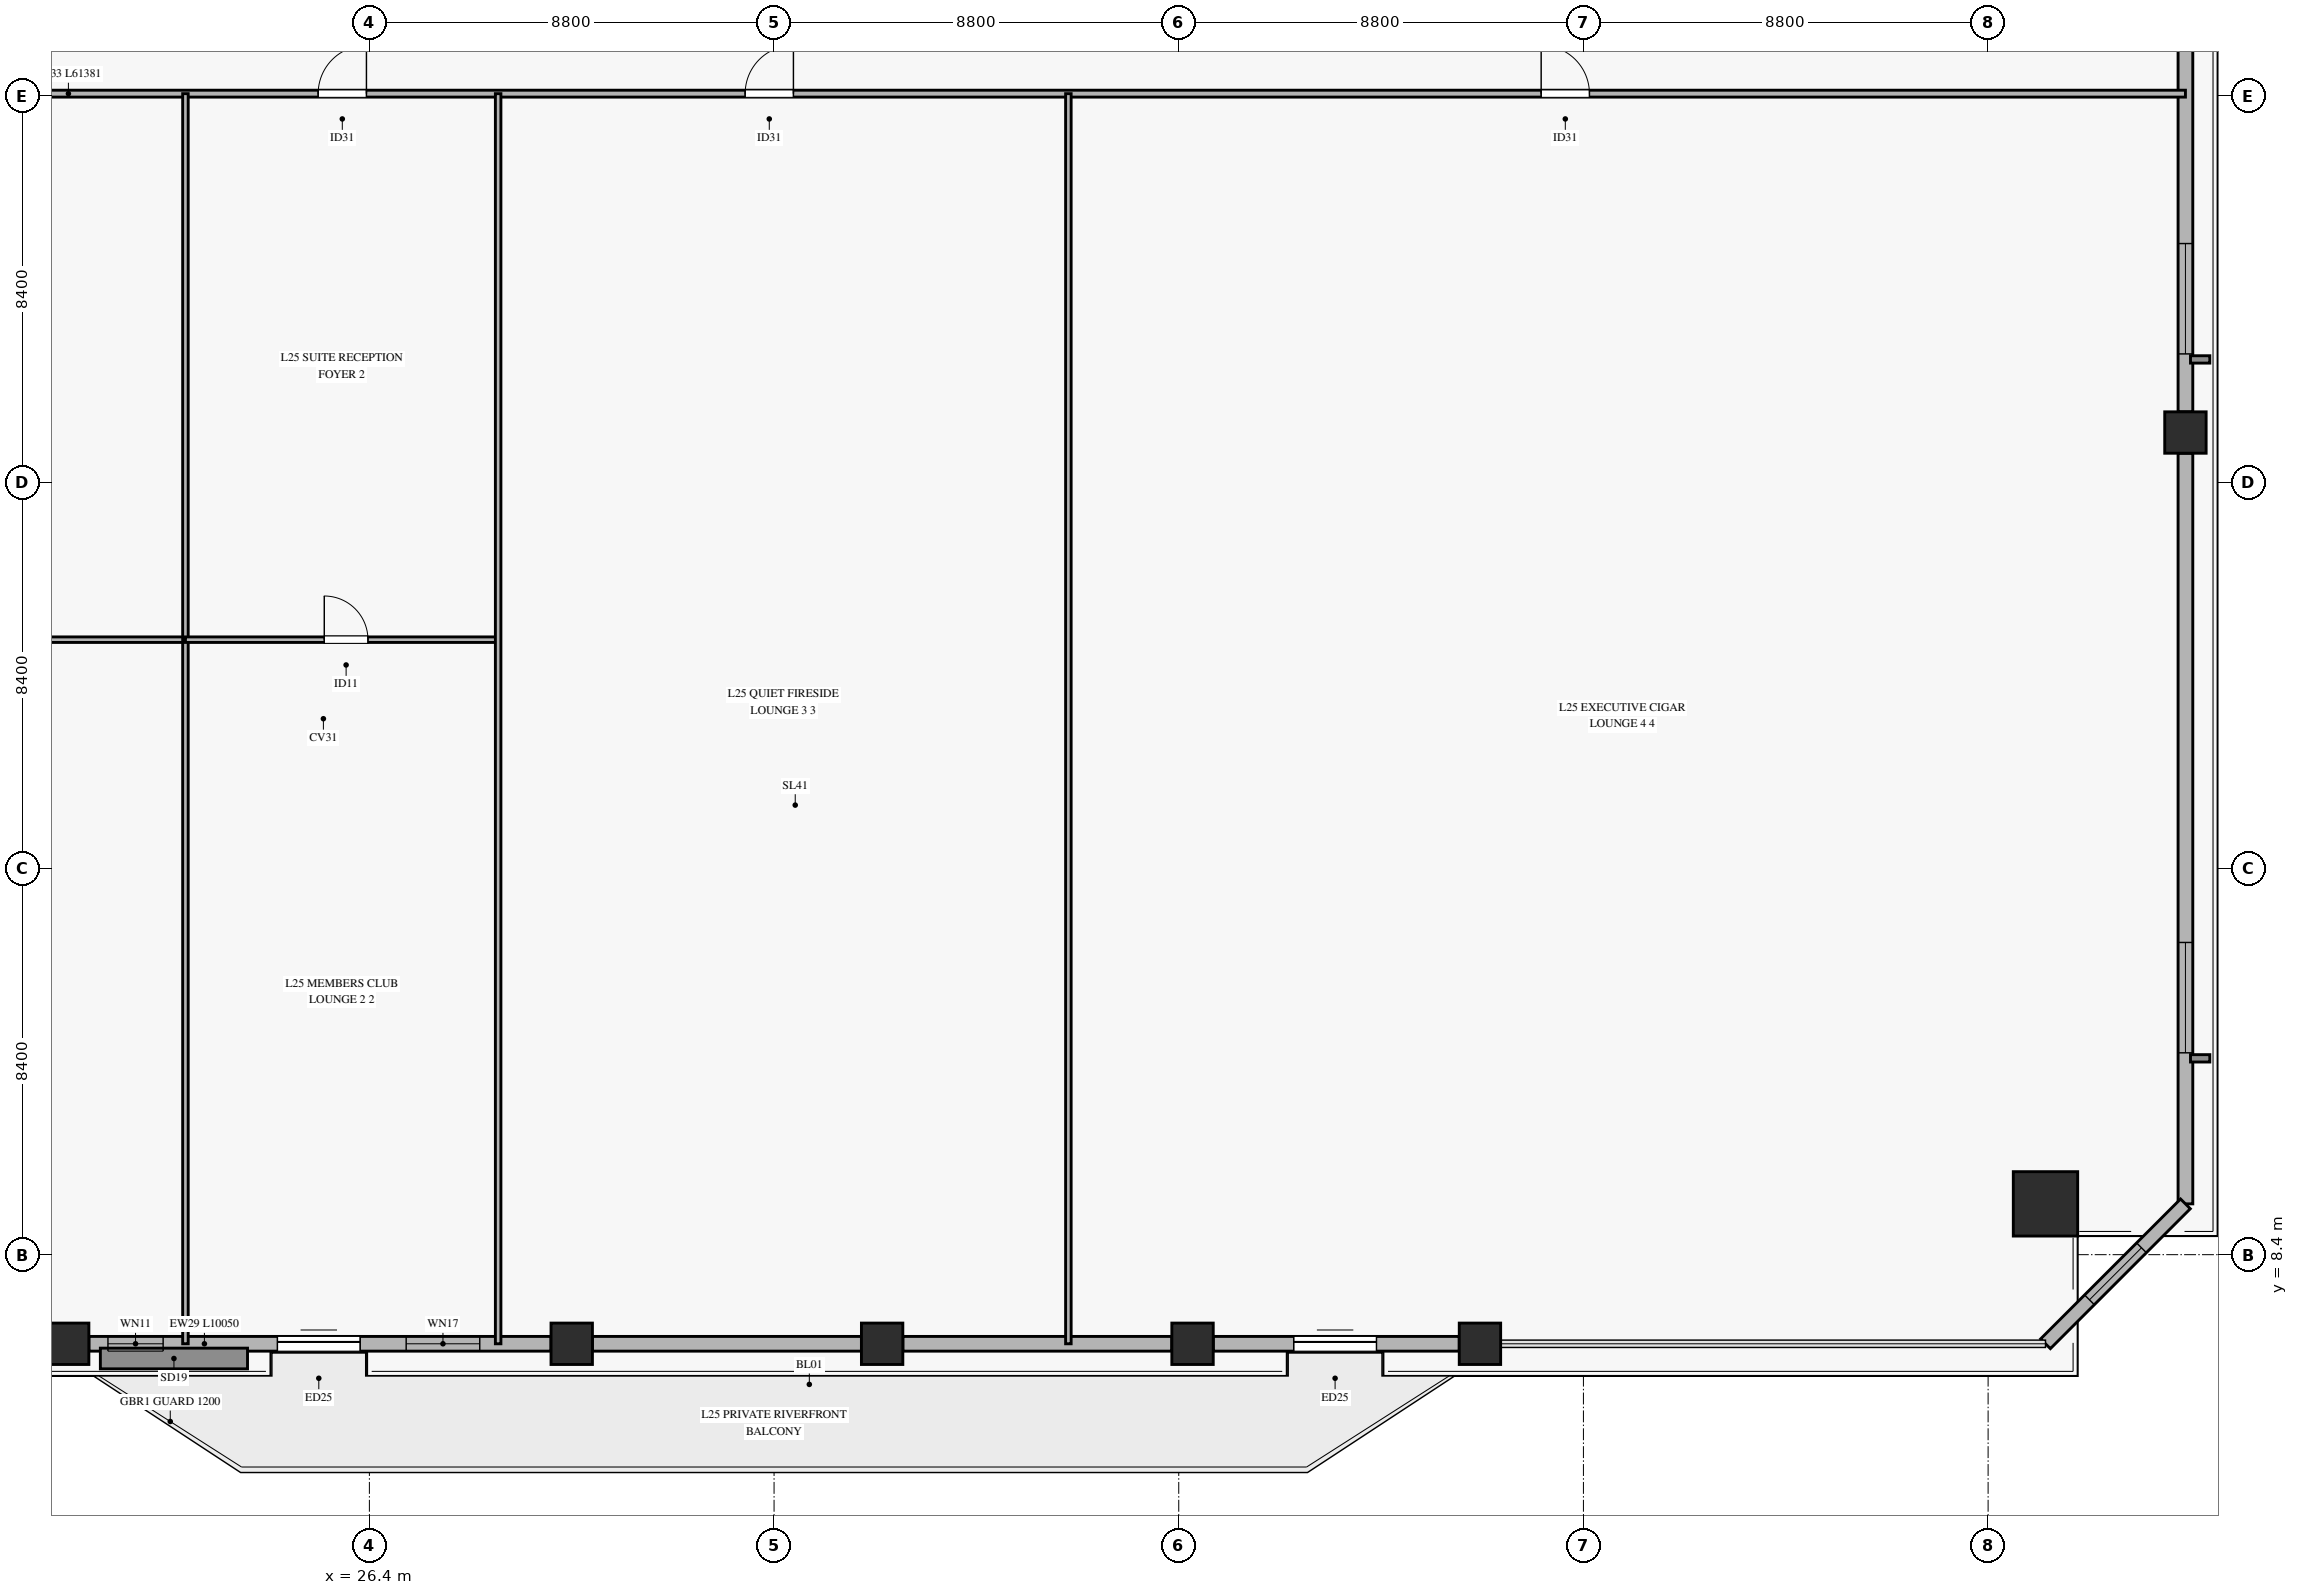
"""IFC4 building model, lengths in metres.
Left out: names, types, materials, properties, quantities, classifications, styles, units other than length and angle.
Written with IfcOpenShell. Run it as: python <this file> out.ifc"""

import sys

from ifc_helpers import new_model, si_unit, direction, frame, frame_2d, origin, origin_2d, place, context, subcontext, project, spatial, rectangle, hollow_rectangle, extrude, source, transform, mapped, element, fill, save


model = new_model("IFC4")
c1 = context("Model", 3, precision=1e-05, world=origin(), true_north=direction((0.0, 1.0)))
c2 = subcontext(c1, "Body", "Model", "MODEL_VIEW")
j1 = project(units=[si_unit("LENGTHUNIT", "METRE"), si_unit("PLANEANGLEUNIT", "RADIAN")], contexts=[c1])
p1 = place(None, origin())
s1 = spatial("IfcSite", under=j1, at=p1, CompositionType="ELEMENT")
p2 = place(p1, origin())
s2 = spatial("IfcBuilding", under=s1, at=p2, CompositionType="ELEMENT")
p3 = place(p2, frame((0.0, 0.0, 103.6)))
s3 = spatial("IfcBuildingStorey", under=s2, at=p3, CompositionType="ELEMENT", Elevation=103.6)
m1 = source(origin(), c2, "Body", "SweptSolid", [
    extrude(hollow_rectangle(XDim=1.4, YDim=1.4, WallThickness=0.065, at=origin_2d()), origin(), (0.0, 0.0, 1.0), 3.68),
])
p4 = place(p3, frame((62.848, 9.505, 0.0), z_axis=(0.0, 0.0, 1.0), x_axis=(1.0, 0.0, 0.0)))
e1 = element("IfcColumn", 1, at=p4, inside=s3, PredefinedType="COLUMN", context=c2, shape_type="MappedRepresentation", body=[
    mapped(m1, transform((0.0, 0.0, 0.0), x_axis=(1.0, 0.0, 0.0), y_axis=(0.0, 1.0, 0.0), z_axis=(0.0, 0.0, 1.0), scale=1.0)),
])
m2 = source(origin(), c2, "Body", "SweptSolid", [
    extrude(hollow_rectangle(XDim=0.9, YDim=0.9, WallThickness=0.04, at=origin_2d()), origin(), (0.0, 0.0, 1.0), 3.68),
])
for number, where, z_axis, x_axis in (
    (2, (19.85, 6.462, 0.0), (0.0, 0.0, 1.0), (1.0, 0.0, 0.0)),
    (3, (30.8, 6.462, 0.0), (0.0, 0.0, 1.0), (1.0, 0.0, 0.0)),
    (4, (37.55, 6.462, 0.0), (0.0, 0.0, 1.0), (1.0, 0.0, 0.0)),
    (5, (44.3, 6.462, 0.0), (0.0, 0.0, 1.0), (1.0, 0.0, 0.0)),
    (6, (50.55, 6.462, 0.0), (0.0, 0.0, 1.0), (1.0, 0.0, 0.0)),
    (7, (65.891, 26.28, 0.0), (0.0, 0.0, 1.0), (1.0, 0.0, 0.0)),
):
    element("IfcColumn", number, at=place(p3, frame(where, z_axis=z_axis, x_axis=x_axis)), inside=s3, PredefinedType="COLUMN", context=c2, shape_type="MappedRepresentation", body=[
        mapped(m2, transform((0.0, 0.0, 0.0), x_axis=(1.0, 0.0, 0.0), y_axis=(0.0, 1.0, 0.0), z_axis=(0.0, 0.0, 1.0), scale=1.0)),
    ])
p5 = place(p3, frame((20.3, 6.462, 0.0), z_axis=(0.0, 0.0, 1.0), x_axis=(1.0, 0.0, 0.0)))
e8 = element("IfcWall", 8, at=p5, inside=s3, PredefinedType="SOLIDWALL", context=c2, shape_type="SweptSolid", body=[
    extrude(rectangle(XDim=10.05, YDim=0.32, at=frame_2d((5.025, 0.0))), origin(), (0.0, 0.0, 1.0), 3.16),
])
p6 = place(p5, frame((4.1, 0.0, 0.0)))
e9 = element("IfcOpeningElement", 9, at=p6, cuts=e8, PredefinedType="OPENING", context=c2, shape_type="SweptSolid", body=[
    extrude(rectangle(XDim=1.8, YDim=2.25, at=frame_2d((0.9, 1.125))), frame((0.0, 0.17, 0.0), z_axis=(0.0, -1.0, 0.0), x_axis=(1.0, 0.0, 0.0)), (0.0, 0.0, 1.0), 0.34),
])
p7 = place(p5, frame((0.415, 0.0, 0.45)))
e10 = element("IfcOpeningElement", 10, at=p7, cuts=e8, PredefinedType="OPENING", context=c2, shape_type="SweptSolid", body=[
    extrude(rectangle(XDim=1.2, YDim=2.0, at=frame_2d((0.6, 1.0))), frame((0.0, 0.17, 0.0), z_axis=(0.0, -1.0, 0.0), x_axis=(1.0, 0.0, 0.0)), (0.0, 0.0, 1.0), 0.34),
])
p8 = place(p5, frame((6.9, 0.0, 0.45)))
e11 = element("IfcOpeningElement", 11, at=p8, cuts=e8, PredefinedType="OPENING", context=c2, shape_type="SweptSolid", body=[
    extrude(rectangle(XDim=1.6, YDim=2.0, at=frame_2d((0.8, 1.0))), frame((0.0, 0.17, 0.0), z_axis=(0.0, -1.0, 0.0), x_axis=(1.0, 0.0, 0.0)), (0.0, 0.0, 1.0), 0.34),
])
for number, where, z_axis, x_axis in (
    (12, (31.25, 6.462, 0.0), (0.0, 0.0, 1.0), (1.0, 0.0, 0.0)),
    (13, (38.0, 6.462, 0.0), (0.0, 0.0, 1.0), (1.0, 0.0, 0.0)),
):
    element("IfcWall", number, at=place(p3, frame(where, z_axis=z_axis, x_axis=x_axis)), inside=s3, PredefinedType="SOLIDWALL", context=c2, shape_type="SweptSolid", body=[
        extrude(rectangle(XDim=5.85, YDim=0.32, at=frame_2d((2.925, 0.0))), origin(), (0.0, 0.0, 1.0), 3.16),
    ])
p9 = place(p3, frame((44.75, 6.462, 0.0), z_axis=(0.0, 0.0, 1.0), x_axis=(1.0, 0.0, 0.0)))
e14 = element("IfcWall", 14, at=p9, inside=s3, PredefinedType="SOLIDWALL", context=c2, shape_type="SweptSolid", body=[
    extrude(rectangle(XDim=5.35, YDim=0.32, at=frame_2d((2.675, 0.0))), origin(), (0.0, 0.0, 1.0), 3.16),
])
p10 = place(p9, frame((1.75, 0.0, 0.0)))
e15 = element("IfcOpeningElement", 15, at=p10, cuts=e14, PredefinedType="OPENING", context=c2, shape_type="SweptSolid", body=[
    extrude(rectangle(XDim=1.8, YDim=2.25, at=frame_2d((0.9, 1.125))), frame((0.0, 0.17, 0.0), z_axis=(0.0, -1.0, 0.0), x_axis=(1.0, 0.0, 0.0)), (0.0, 0.0, 1.0), 0.34),
])
p11 = place(p3, frame((65.891, 9.505, 0.0), z_axis=(0.0, 0.0, 1.0), x_axis=(0.0, 1.0, 0.0)))
e16 = element("IfcWall", 16, at=p11, inside=s3, PredefinedType="SOLIDWALL", context=c2, shape_type="SweptSolid", body=[
    extrude(rectangle(XDim=16.325, YDim=0.32, at=frame_2d((8.163, 0.0))), origin(), (0.0, 0.0, 1.0), 3.16),
])
p12 = place(p11, frame((3.285, 0.0, 0.45)))
e17 = element("IfcOpeningElement", 17, at=p12, cuts=e16, PredefinedType="OPENING", context=c2, shape_type="SweptSolid", body=[
    extrude(rectangle(XDim=2.4, YDim=2.1, at=frame_2d((1.2, 1.05))), frame((0.0, 0.17, 0.0), z_axis=(0.0, -1.0, 0.0), x_axis=(1.0, 0.0, 0.0)), (0.0, 0.0, 1.0), 0.34),
])
p13 = place(p3, frame((65.891, 26.73, 0.0), z_axis=(0.0, 0.0, 1.0), x_axis=(0.0, 1.0, 0.0)))
e18 = element("IfcWall", 18, at=p13, inside=s3, PredefinedType="SOLIDWALL", context=c2, shape_type="SweptSolid", body=[
    extrude(rectangle(XDim=16.326, YDim=0.32, at=frame_2d((8.163, 0.0))), origin(), (0.0, 0.0, 1.0), 3.16),
])
p14 = place(p13, frame((1.26, 0.0, 0.45)))
e19 = element("IfcOpeningElement", 19, at=p14, cuts=e18, PredefinedType="OPENING", context=c2, shape_type="SweptSolid", body=[
    extrude(rectangle(XDim=2.4, YDim=2.1, at=frame_2d((1.2, 1.05))), frame((0.0, 0.17, 0.0), z_axis=(0.0, -1.0, 0.0), x_axis=(1.0, 0.0, 0.0)), (0.0, 0.0, 1.0), 0.34),
])
p15 = place(p13, frame((12.574, 0.0, 0.45)))
e20 = element("IfcOpeningElement", 20, at=p15, cuts=e18, PredefinedType="OPENING", context=c2, shape_type="SweptSolid", body=[
    extrude(rectangle(XDim=2.4, YDim=2.1, at=frame_2d((1.2, 1.05))), frame((0.0, 0.17, 0.0), z_axis=(0.0, -1.0, 0.0), x_axis=(1.0, 0.0, 0.0)), (0.0, 0.0, 1.0), 0.34),
])
p16 = place(p3, frame((62.848, 6.462, 0.0), z_axis=(0.0, 0.0, 1.0), x_axis=(0.707135145445, 0.70707841579, 0.0)))
e21 = element("IfcWall", 21, at=p16, inside=s3, PredefinedType="SOLIDWALL", context=c2, shape_type="SweptSolid", body=[
    extrude(rectangle(XDim=4.303, YDim=0.3, at=frame_2d((2.152, 0.0))), origin(), (0.0, 0.0, 1.0), 3.16),
])
p17 = place(p16, frame((1.352, 0.0, 0.45)))
e22 = element("IfcOpeningElement", 22, at=p17, cuts=e21, PredefinedType="OPENING", context=c2, shape_type="SweptSolid", body=[
    extrude(rectangle(XDim=1.6, YDim=2.0, at=frame_2d((0.8, 1.0))), frame((0.0, 0.16, 0.0), z_axis=(0.0, -1.0, 0.0), x_axis=(1.0, 0.0, 0.0)), (0.0, 0.0, 1.0), 0.32),
])
p18 = place(p3, frame((4.51, 33.65, 0.0), z_axis=(0.0, 0.0, 1.0), x_axis=(1.0, 0.0, 0.0)))
e23 = element("IfcWall", 23, at=p18, inside=s3, PredefinedType="PARTITIONING", context=c2, shape_type="SweptSolid", body=[
    extrude(rectangle(XDim=61.381, YDim=0.15, at=frame_2d((30.69, 0.0))), origin(), (0.0, 0.0, 1.0), 2.765),
])
p19 = place(p18, frame((7.442, 0.0, 0.0)))
e24 = element("IfcOpeningElement", 24, at=p19, cuts=e23, PredefinedType="OPENING", context=c2, shape_type="SweptSolid", body=[
    extrude(rectangle(XDim=1.05, YDim=2.15, at=frame_2d((0.525, 1.075))), frame((0.0, 0.085, 0.0), z_axis=(0.0, -1.0, 0.0), x_axis=(1.0, 0.0, 0.0)), (0.0, 0.0, 1.0), 0.17),
])
p20 = place(p18, frame((20.776, 0.0, 0.0)))
e25 = element("IfcOpeningElement", 25, at=p20, cuts=e23, PredefinedType="OPENING", context=c2, shape_type="SweptSolid", body=[
    extrude(rectangle(XDim=1.05, YDim=2.15, at=frame_2d((0.525, 1.075))), frame((0.0, 0.085, 0.0), z_axis=(0.0, -1.0, 0.0), x_axis=(1.0, 0.0, 0.0)), (0.0, 0.0, 1.0), 0.17),
])
p21 = place(p18, frame((30.061, 0.0, 0.0)))
e26 = element("IfcOpeningElement", 26, at=p21, cuts=e23, PredefinedType="OPENING", context=c2, shape_type="SweptSolid", body=[
    extrude(rectangle(XDim=1.05, YDim=2.15, at=frame_2d((0.525, 1.075))), frame((0.0, 0.085, 0.0), z_axis=(0.0, -1.0, 0.0), x_axis=(1.0, 0.0, 0.0)), (0.0, 0.0, 1.0), 0.17),
])
p22 = place(p18, frame((47.371, 0.0, 0.0)))
e27 = element("IfcOpeningElement", 27, at=p22, cuts=e23, PredefinedType="OPENING", context=c2, shape_type="SweptSolid", body=[
    extrude(rectangle(XDim=1.05, YDim=2.15, at=frame_2d((0.525, 1.075))), frame((0.0, 0.085, 0.0), z_axis=(0.0, -1.0, 0.0), x_axis=(1.0, 0.0, 0.0)), (0.0, 0.0, 1.0), 0.17),
])
p23 = place(p3, frame((4.51, 21.775, 0.0), z_axis=(0.0, 0.0, 1.0), x_axis=(1.0, 0.0, 0.0)))
e28 = element("IfcWall", 28, at=p23, inside=s3, PredefinedType="PARTITIONING", context=c2, shape_type="SweptSolid", body=[
    extrude(rectangle(XDim=17.89, YDim=0.12, at=frame_2d((8.945, 0.0))), origin(), (0.0, 0.0, 1.0), 2.765),
])
p24 = place(p23, frame((7.793, 0.0, 0.0)))
e29 = element("IfcOpeningElement", 29, at=p24, cuts=e28, PredefinedType="OPENING", context=c2, shape_type="SweptSolid", body=[
    extrude(rectangle(XDim=0.95, YDim=2.1, at=frame_2d((0.475, 1.05))), frame((0.0, 0.07, 0.0), z_axis=(0.0, -1.0, 0.0), x_axis=(1.0, 0.0, 0.0)), (0.0, 0.0, 1.0), 0.14),
])
p25 = place(p3, frame((22.4, 6.462, 0.0), z_axis=(0.0, 0.0, 1.0), x_axis=(0.0, 1.0, 0.0)))
e30 = element("IfcWall", 30, at=p25, inside=s3, PredefinedType="PARTITIONING", context=c2, shape_type="SweptSolid", body=[
    extrude(rectangle(XDim=27.188, YDim=0.12, at=frame_2d((13.594, 0.0))), origin(), (0.0, 0.0, 1.0), 3.165),
])
p26 = place(p3, frame((22.4, 21.775, 0.0), z_axis=(0.0, 0.0, 1.0), x_axis=(1.0, 0.0, 0.0)))
e31 = element("IfcWall", 31, at=p26, inside=s3, PredefinedType="PARTITIONING", context=c2, shape_type="SweptSolid", body=[
    extrude(rectangle(XDim=6.8, YDim=0.12, at=frame_2d((3.4, 0.0))), origin(), (0.0, 0.0, 1.0), 3.215),
])
p27 = place(p26, frame((3.019, 0.0, 0.0)))
e32 = element("IfcOpeningElement", 32, at=p27, cuts=e31, PredefinedType="OPENING", context=c2, shape_type="SweptSolid", body=[
    extrude(rectangle(XDim=0.95, YDim=2.1, at=frame_2d((0.475, 1.05))), frame((0.0, 0.07, 0.0), z_axis=(0.0, -1.0, 0.0), x_axis=(1.0, 0.0, 0.0)), (0.0, 0.0, 1.0), 0.14),
])
for number, where, z_axis, x_axis in (
    (33, (29.2, 6.462, 0.0), (0.0, 0.0, 1.0), (0.0, 1.0, 0.0)),
    (34, (41.6, 6.462, 0.0), (0.0, 0.0, 1.0), (0.0, 1.0, 0.0)),
):
    element("IfcWall", number, at=place(p3, frame(where, z_axis=z_axis, x_axis=x_axis)), inside=s3, PredefinedType="PARTITIONING", context=c2, shape_type="SweptSolid", body=[
        extrude(rectangle(XDim=27.188, YDim=0.12, at=frame_2d((13.594, 0.0))), origin(), (0.0, 0.0, 1.0), 3.165),
    ])
m3 = source(origin(), c2, "Body", "SweptSolid", [
    extrude(rectangle(XDim=1.8, YDim=2.25, at=frame_2d((0.9, 1.125))), frame((0.0, 0.025, 0.0), z_axis=(0.0, -1.0, 0.0), x_axis=(1.0, 0.0, 0.0)), (0.0, 0.0, 1.0), 0.05),
])
p28 = place(p6, origin())
e35 = element("IfcDoor", 35, at=p28, inside=s3, OperationType="SLIDING_TO_LEFT", PredefinedType="DOOR", context=c2, shape_type="MappedRepresentation", body=[
    mapped(m3, transform((0.0, 0.0, 0.0), x_axis=(1.0, 0.0, 0.0), y_axis=(0.0, 1.0, 0.0), z_axis=(0.0, 0.0, 1.0), scale=1.0)),
])
fill(e9, e35)
m4 = source(origin(), c2, "Body", "SweptSolid", [
    extrude(rectangle(XDim=1.2, YDim=2.0, at=frame_2d((0.6, 1.0))), frame((0.0, 0.03, 0.0), z_axis=(0.0, -1.0, 0.0), x_axis=(1.0, 0.0, 0.0)), (0.0, 0.0, 1.0), 0.06),
])
p29 = place(p7, origin())
e36 = element("IfcWindow", 36, at=p29, inside=s3, PartitioningType="SINGLE_PANEL", PredefinedType="WINDOW", context=c2, shape_type="MappedRepresentation", body=[
    mapped(m4, transform((0.0, 0.0, 0.0), x_axis=(1.0, 0.0, 0.0), y_axis=(0.0, 1.0, 0.0), z_axis=(0.0, 0.0, 1.0), scale=1.0)),
])
fill(e10, e36)
m5 = source(origin(), c2, "Body", "SweptSolid", [
    extrude(rectangle(XDim=1.6, YDim=2.0, at=frame_2d((0.8, 1.0))), frame((0.0, 0.03, 0.0), z_axis=(0.0, -1.0, 0.0), x_axis=(1.0, 0.0, 0.0)), (0.0, 0.0, 1.0), 0.06),
])
p30 = place(p8, origin())
e37 = element("IfcWindow", 37, at=p30, inside=s3, PartitioningType="SINGLE_PANEL", PredefinedType="WINDOW", context=c2, shape_type="MappedRepresentation", body=[
    mapped(m5, transform((0.0, 0.0, 0.0), x_axis=(1.0, 0.0, 0.0), y_axis=(0.0, 1.0, 0.0), z_axis=(0.0, 0.0, 1.0), scale=1.0)),
])
fill(e11, e37)
p31 = place(p10, origin())
e38 = element("IfcDoor", 38, at=p31, inside=s3, OperationType="SLIDING_TO_LEFT", PredefinedType="DOOR", context=c2, shape_type="MappedRepresentation", body=[
    mapped(m3, transform((0.0, 0.0, 0.0), x_axis=(1.0, 0.0, 0.0), y_axis=(0.0, 1.0, 0.0), z_axis=(0.0, 0.0, 1.0), scale=1.0)),
])
fill(e15, e38)
m6 = source(origin(), c2, "Body", "SweptSolid", [
    extrude(rectangle(XDim=2.4, YDim=2.1, at=frame_2d((1.2, 1.05))), frame((0.0, 0.03, 0.0), z_axis=(0.0, -1.0, 0.0), x_axis=(1.0, 0.0, 0.0)), (0.0, 0.0, 1.0), 0.06),
])
p32 = place(p12, origin())
e39 = element("IfcWindow", 39, at=p32, inside=s3, PartitioningType="SINGLE_PANEL", PredefinedType="WINDOW", context=c2, shape_type="MappedRepresentation", body=[
    mapped(m6, transform((0.0, 0.0, 0.0), x_axis=(1.0, 0.0, 0.0), y_axis=(0.0, 1.0, 0.0), z_axis=(0.0, 0.0, 1.0), scale=1.0)),
])
fill(e17, e39)
p33 = place(p14, origin())
e40 = element("IfcWindow", 40, at=p33, inside=s3, PartitioningType="SINGLE_PANEL", PredefinedType="WINDOW", context=c2, shape_type="MappedRepresentation", body=[
    mapped(m6, transform((0.0, 0.0, 0.0), x_axis=(1.0, 0.0, 0.0), y_axis=(0.0, 1.0, 0.0), z_axis=(0.0, 0.0, 1.0), scale=1.0)),
])
fill(e19, e40)
p34 = place(p17, origin())
e41 = element("IfcWindow", 41, at=p34, inside=s3, PartitioningType="SINGLE_PANEL", PredefinedType="WINDOW", context=c2, shape_type="MappedRepresentation", body=[
    mapped(m5, transform((0.0, 0.0, 0.0), x_axis=(1.0, 0.0, 0.0), y_axis=(0.0, 1.0, 0.0), z_axis=(0.0, 0.0, 1.0), scale=1.0)),
])
fill(e22, e41)
m7 = source(origin(), c2, "Body", "SweptSolid", [
    extrude(rectangle(XDim=1.05, YDim=2.15, at=frame_2d((0.525, 1.075))), frame((0.0, 0.025, 0.0), z_axis=(0.0, -1.0, 0.0), x_axis=(1.0, 0.0, 0.0)), (0.0, 0.0, 1.0), 0.05),
])
p35 = place(p20, origin())
e42 = element("IfcDoor", 42, at=p35, inside=s3, OperationType="SINGLE_SWING_RIGHT", PredefinedType="DOOR", context=c2, shape_type="MappedRepresentation", body=[
    mapped(m7, transform((0.0, 0.0, 0.0), x_axis=(1.0, 0.0, 0.0), y_axis=(0.0, 1.0, 0.0), z_axis=(0.0, 0.0, 1.0), scale=1.0)),
])
fill(e25, e42)
m8 = source(origin(), c2, "Body", "SweptSolid", [
    extrude(rectangle(XDim=0.95, YDim=2.1, at=frame_2d((0.475, 1.05))), frame((0.0, 0.025, 0.0), z_axis=(0.0, -1.0, 0.0), x_axis=(1.0, 0.0, 0.0)), (0.0, 0.0, 1.0), 0.05),
])
p36 = place(p27, origin())
e43 = element("IfcDoor", 43, at=p36, inside=s3, OperationType="SINGLE_SWING_LEFT", PredefinedType="DOOR", context=c2, shape_type="MappedRepresentation", body=[
    mapped(m8, transform((0.0, 0.0, 0.0), x_axis=(1.0, 0.0, 0.0), y_axis=(0.0, 1.0, 0.0), z_axis=(0.0, 0.0, 1.0), scale=1.0)),
])
fill(e32, e43)
p37 = place(p21, origin())
e44 = element("IfcDoor", 44, at=p37, inside=s3, OperationType="SINGLE_SWING_RIGHT", PredefinedType="DOOR", context=c2, shape_type="MappedRepresentation", body=[
    mapped(m7, transform((0.0, 0.0, 0.0), x_axis=(1.0, 0.0, 0.0), y_axis=(0.0, 1.0, 0.0), z_axis=(0.0, 0.0, 1.0), scale=1.0)),
])
fill(e26, e44)
p38 = place(p22, origin())
e45 = element("IfcDoor", 45, at=p38, inside=s3, OperationType="SINGLE_SWING_LEFT", PredefinedType="DOOR", context=c2, shape_type="MappedRepresentation", body=[
    mapped(m7, transform((0.0, 0.0, 0.0), x_axis=(1.0, 0.0, 0.0), y_axis=(0.0, 1.0, 0.0), z_axis=(0.0, 0.0, 1.0), scale=1.0)),
])
fill(e27, e45)
save(model, sys.argv[1])
